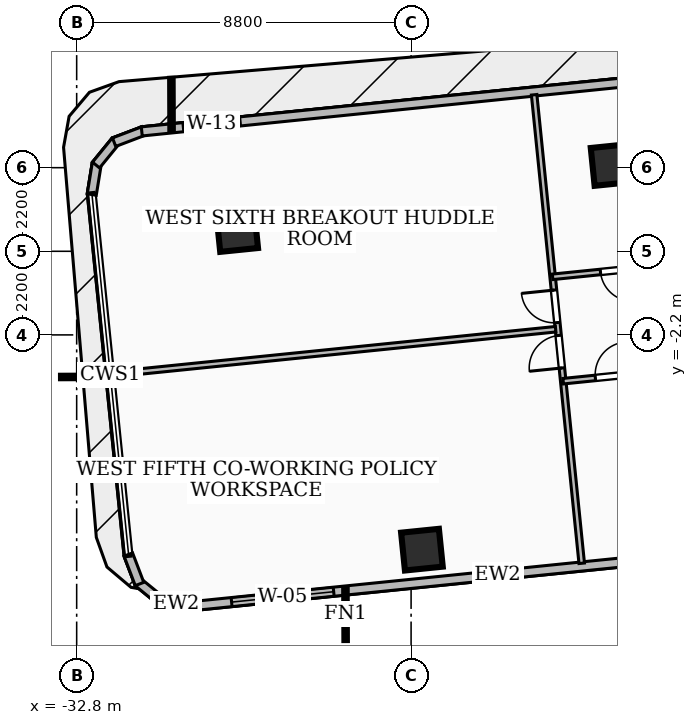
"""IFC4 building model, lengths in metres.
Left out: names, types, materials, properties, quantities, classifications, styles, units other than length and angle.
Written with IfcOpenShell. Run it as: python <this file> out.ifc"""

import sys

from ifc_helpers import new_model, si_unit, direction, frame, frame_2d, origin, origin_2d, place, context, subcontext, project, spatial, rectangle, extrude, element, fill, save


model = new_model("IFC4")
c1 = context("Model", 3, precision=1e-05, world=origin(), true_north=direction((0.0, 1.0)))
c2 = subcontext(c1, "Body", "Model", "MODEL_VIEW")
j1 = project(units=[si_unit("LENGTHUNIT", "METRE"), si_unit("PLANEANGLEUNIT", "RADIAN")], contexts=[c1])
p1 = place(None, origin())
s1 = spatial("IfcSite", under=j1, at=p1, CompositionType="ELEMENT")
p2 = place(p1, origin())
s2 = spatial("IfcBuilding", under=s1, at=p2, CompositionType="ELEMENT")
p3 = place(p2, frame((0.0, 0.0, 67.68)))
s3 = spatial("IfcBuildingStorey", under=s2, at=p3, CompositionType="ELEMENT", Elevation=67.68)
for number, where, z_axis, x_axis in (
    (1, (-18.724, 2.271, 0.0), (0.0, 0.0, 1.0), (0.995, 0.101, 0.0)),
    (2, (-28.576, 0.533, 0.0), (0.0, 0.0, 1.0), (0.995, 0.101, 0.0)),
    (3, (-23.715, -7.851, 0.0), (0.0, 0.0, 1.0), (0.995, 0.101, 0.0)),
):
    element("IfcColumn", number, at=place(p3, frame(where, z_axis=z_axis, x_axis=x_axis)), inside=s3, PredefinedType="COLUMN", context=c2, shape_type="SweptSolid", body=[
        extrude(rectangle(XDim=1.0, YDim=1.0, at=origin_2d()), origin(), (0.0, 0.0, 1.0), 3.6),
    ])
p4 = place(p3, frame((-13.626, -7.696, 0.0), z_axis=(0.0, 0.0, 1.0), x_axis=(-0.994872930989, -0.101132839298, 0.0)))
e4 = element("IfcWall", 4, at=p4, inside=s3, PredefinedType="SOLIDWALL", context=c2, shape_type="SweptSolid", body=[
    extrude(rectangle(XDim=16.276, YDim=0.24, at=frame_2d((8.138, 0.0))), origin(), (0.0, 0.0, 1.0), 3.34),
])
p5 = place(p4, frame((12.475, 0.0, 0.85)))
e5 = element("IfcOpeningElement", 5, at=p5, cuts=e4, PredefinedType="OPENING", context=c2, shape_type="SweptSolid", body=[
    extrude(rectangle(XDim=2.7, YDim=1.85, at=frame_2d((1.35, 0.925))), frame((0.0, 0.13, 0.0), z_axis=(0.0, -1.0, 0.0), x_axis=(1.0, 0.0, 0.0)), (0.0, 0.0, 1.0), 0.26),
])
p6 = place(p3, frame((-29.768, -9.343, 0.0), z_axis=(0.0, 0.0, 1.0), x_axis=(-0.987084128833, 0.160202754679, 0.0)))
e6 = element("IfcWall", 6, at=p6, inside=s3, PredefinedType="SOLIDWALL", context=c2, shape_type="SweptSolid", body=[
    extrude(rectangle(XDim=0.831, YDim=0.24, at=frame_2d((0.415, 0.0))), origin(), (0.0, 0.0, 1.0), 3.34),
])
p7 = place(p3, frame((-30.544, -9.23, 0.0), z_axis=(0.0, 0.0, 1.0), x_axis=(-0.774358164226, 0.632747527452, 0.0)))
e7 = element("IfcWall", 7, at=p7, inside=s3, PredefinedType="SOLIDWALL", context=c2, shape_type="SweptSolid", body=[
    extrude(rectangle(XDim=0.814, YDim=0.24, at=frame_2d((0.407, 0.0))), origin(), (0.0, 0.0, 1.0), 3.34),
])
p8 = place(p3, frame((-31.146, -8.754, 0.0), z_axis=(0.0, 0.0, 1.0), x_axis=(-0.355701438235, 0.934599639866, 0.0)))
e8 = element("IfcWall", 8, at=p8, inside=s3, PredefinedType="SOLIDWALL", context=c2, shape_type="SweptSolid", body=[
    extrude(rectangle(XDim=0.829, YDim=0.24, at=frame_2d((0.415, 0.0))), origin(), (0.0, 0.0, 1.0), 3.34),
])
p9 = place(p3, frame((-32.403, 1.493, 0.0), z_axis=(0.0, 0.0, 1.0), x_axis=(0.160156284613, 0.987091669755, 0.0)))
e9 = element("IfcWall", 9, at=p9, inside=s3, PredefinedType="SOLIDWALL", context=c2, shape_type="SweptSolid", body=[
    extrude(rectangle(XDim=0.831, YDim=0.24, at=frame_2d((0.416, 0.0))), origin(), (0.0, 0.0, 1.0), 3.34),
])
p10 = place(p3, frame((-32.29, 2.269, 0.0), z_axis=(0.0, 0.0, 1.0), x_axis=(0.632354425822, 0.774679211121, 0.0)))
e10 = element("IfcWall", 10, at=p10, inside=s3, PredefinedType="SOLIDWALL", context=c2, shape_type="SweptSolid", body=[
    extrude(rectangle(XDim=0.813, YDim=0.24, at=frame_2d((0.406, 0.0))), origin(), (0.0, 0.0, 1.0), 3.34),
])
p11 = place(p3, frame((-31.815, 2.871, 0.0), z_axis=(0.0, 0.0, 1.0), x_axis=(0.934748415991, 0.355310285248, 0.0)))
e11 = element("IfcWall", 11, at=p11, inside=s3, PredefinedType="SOLIDWALL", context=c2, shape_type="SweptSolid", body=[
    extrude(rectangle(XDim=0.83, YDim=0.24, at=frame_2d((0.415, 0.0))), origin(), (0.0, 0.0, 1.0), 3.34),
])
p12 = place(p3, frame((-31.087, 3.154, 0.0), z_axis=(0.0, 0.0, 1.0), x_axis=(0.994872777564, 0.101134348577, 0.0)))
e12 = element("IfcWall", 12, at=p12, inside=s3, PredefinedType="SOLIDWALL", context=c2, shape_type="SweptSolid", body=[
    extrude(rectangle(XDim=16.275, YDim=0.24, at=frame_2d((8.138, 0.0))), origin(), (0.0, 0.0, 1.0), 3.34),
])
p13 = place(p12, frame((1.1, 0.0, 0.85)))
e13 = element("IfcOpeningElement", 13, at=p13, cuts=e12, PredefinedType="OPENING", context=c2, shape_type="SweptSolid", body=[
    extrude(rectangle(XDim=1.5, YDim=1.8, at=frame_2d((0.75, 0.9))), frame((0.0, 0.13, 0.0), z_axis=(0.0, -1.0, 0.0), x_axis=(1.0, 0.0, 0.0)), (0.0, 0.0, 1.0), 0.26),
])
p14 = place(p3, frame((-19.997, -3.418, 0.0), z_axis=(0.0, 0.0, 1.0), x_axis=(0.994885342511, 0.101010669028, 0.0)))
e14 = element("IfcWall", 14, at=p14, inside=s3, PredefinedType="PARTITIONING", context=c2, shape_type="SweptSolid", body=[
    extrude(rectangle(XDim=5.951, YDim=0.145, at=frame_2d((2.975, 0.0))), origin(), (0.0, 0.0, 1.0), 3.34),
])
p15 = place(p14, frame((3.825, 0.0, 0.0)))
e15 = element("IfcOpeningElement", 15, at=p15, cuts=e14, PredefinedType="OPENING", context=c2, shape_type="SweptSolid", body=[
    extrude(rectangle(XDim=0.86, YDim=2.04, at=frame_2d((0.43, 1.02))), frame((0.0, 0.083, 0.0), z_axis=(0.0, -1.0, 0.0), x_axis=(1.0, 0.0, 0.0)), (0.0, 0.0, 1.0), 0.165),
])
p16 = place(p14, frame((0.85, 0.0, 0.0)))
e16 = element("IfcOpeningElement", 16, at=p16, cuts=e14, PredefinedType="OPENING", context=c2, shape_type="SweptSolid", body=[
    extrude(rectangle(XDim=0.86, YDim=2.04, at=frame_2d((0.43, 1.02))), frame((0.0, 0.083, 0.0), z_axis=(0.0, -1.0, 0.0), x_axis=(1.0, 0.0, 0.0)), (0.0, 0.0, 1.0), 0.165),
])
p17 = place(p3, frame((-14.356, -0.071, 0.0), z_axis=(0.0, 0.0, 1.0), x_axis=(-0.994884923871, -0.101014792254, 0.0)))
e17 = element("IfcWall", 17, at=p17, inside=s3, PredefinedType="PARTITIONING", context=c2, shape_type="SweptSolid", body=[
    extrude(rectangle(XDim=5.95, YDim=0.145, at=frame_2d((2.975, 0.0))), origin(), (0.0, 0.0, 1.0), 3.34),
])
p18 = place(p17, frame((0.85, 0.0, 0.0)))
e18 = element("IfcOpeningElement", 18, at=p18, cuts=e17, PredefinedType="OPENING", context=c2, shape_type="SweptSolid", body=[
    extrude(rectangle(XDim=0.86, YDim=2.04, at=frame_2d((0.43, 1.02))), frame((0.0, 0.083, 0.0), z_axis=(0.0, -1.0, 0.0), x_axis=(1.0, 0.0, 0.0)), (0.0, 0.0, 1.0), 0.165),
])
p19 = place(p17, frame((3.825, 0.0, 0.0)))
e19 = element("IfcOpeningElement", 19, at=p19, cuts=e17, PredefinedType="OPENING", context=c2, shape_type="SweptSolid", body=[
    extrude(rectangle(XDim=0.86, YDim=2.04, at=frame_2d((0.43, 1.02))), frame((0.0, 0.083, 0.0), z_axis=(0.0, -1.0, 0.0), x_axis=(1.0, 0.0, 0.0)), (0.0, 0.0, 1.0), 0.165),
])
p20 = place(p3, frame((-20.196, -2.051, 0.0), z_axis=(0.0, 0.0, 1.0), x_axis=(-0.994871935232, -0.101142634371, 0.0)))
e20 = element("IfcWall", 20, at=p20, inside=s3, PredefinedType="PARTITIONING", context=c2, shape_type="SweptSolid", body=[
    extrude(rectangle(XDim=11.695, YDim=0.145, at=frame_2d((5.848, 0.0))), origin(), (0.0, 0.0, 1.0), 2.793),
])
p21 = place(p3, frame((-19.51, -8.209, 0.0), z_axis=(0.0, 0.0, 1.0), x_axis=(-0.101042864496, 0.99488207318, 0.0)))
e21 = element("IfcWall", 21, at=p21, inside=s3, PredefinedType="PARTITIONING", context=c2, shape_type="SweptSolid", body=[
    extrude(rectangle(XDim=12.39, YDim=0.145, at=frame_2d((6.195, 0.0))), origin(), (0.0, 0.0, 1.0), 2.486),
])
p22 = place(p21, frame((6.365, 0.0, 0.0)))
e22 = element("IfcOpeningElement", 22, at=p22, cuts=e21, PredefinedType="OPENING", context=c2, shape_type="SweptSolid", body=[
    extrude(rectangle(XDim=0.86, YDim=2.04, at=frame_2d((0.43, 1.02))), frame((0.0, 0.083, 0.0), z_axis=(0.0, -1.0, 0.0), x_axis=(1.0, 0.0, 0.0)), (0.0, 0.0, 1.0), 0.165),
])
p23 = place(p21, frame((5.165, 0.0, 0.0)))
e23 = element("IfcOpeningElement", 23, at=p23, cuts=e21, PredefinedType="OPENING", context=c2, shape_type="SweptSolid", body=[
    extrude(rectangle(XDim=0.86, YDim=2.04, at=frame_2d((0.43, 1.02))), frame((0.0, 0.083, 0.0), z_axis=(0.0, -1.0, 0.0), x_axis=(1.0, 0.0, 0.0)), (0.0, 0.0, 1.0), 0.165),
])
p24 = place(p5, origin())
e24 = element("IfcWindow", 24, at=p24, inside=s3, PartitioningType="SINGLE_PANEL", PredefinedType="WINDOW", context=c2, shape_type="SweptSolid", body=[
    extrude(rectangle(XDim=2.7, YDim=1.85, at=frame_2d((1.35, 0.925))), frame((0.0, 0.03, 0.0), z_axis=(0.0, -1.0, 0.0), x_axis=(1.0, 0.0, 0.0)), (0.0, 0.0, 1.0), 0.06),
])
fill(e5, e24)
p25 = place(p13, origin())
e25 = element("IfcWindow", 25, at=p25, inside=s3, PartitioningType="SINGLE_PANEL", PredefinedType="WINDOW", context=c2, shape_type="SweptSolid", body=[
    extrude(rectangle(XDim=1.5, YDim=1.8, at=frame_2d((0.75, 0.9))), frame((0.0, 0.03, 0.0), z_axis=(0.0, -1.0, 0.0), x_axis=(1.0, 0.0, 0.0)), (0.0, 0.0, 1.0), 0.06),
])
fill(e13, e25)
p26 = place(p16, origin())
e26 = element("IfcDoor", 26, at=p26, inside=s3, OperationType="SINGLE_SWING_RIGHT", PredefinedType="DOOR", context=c2, shape_type="SweptSolid", body=[
    extrude(rectangle(XDim=0.86, YDim=2.04, at=frame_2d((0.43, 1.02))), frame((0.0, 0.025, 0.0), z_axis=(0.0, -1.0, 0.0), x_axis=(1.0, 0.0, 0.0)), (0.0, 0.0, 1.0), 0.05),
])
fill(e16, e26)
p27 = place(p19, origin())
e27 = element("IfcDoor", 27, at=p27, inside=s3, OperationType="SINGLE_SWING_LEFT", PredefinedType="DOOR", context=c2, shape_type="SweptSolid", body=[
    extrude(rectangle(XDim=0.86, YDim=2.04, at=frame_2d((0.43, 1.02))), frame((0.0, 0.025, 0.0), z_axis=(0.0, -1.0, 0.0), x_axis=(1.0, 0.0, 0.0)), (0.0, 0.0, 1.0), 0.05),
])
fill(e19, e27)
p28 = place(p22, origin())
e28 = element("IfcDoor", 28, at=p28, inside=s3, OperationType="SINGLE_SWING_RIGHT", PredefinedType="DOOR", context=c2, shape_type="SweptSolid", body=[
    extrude(rectangle(XDim=0.86, YDim=2.04, at=frame_2d((0.43, 1.02))), frame((0.0, 0.025, 0.0), z_axis=(0.0, -1.0, 0.0), x_axis=(1.0, 0.0, 0.0)), (0.0, 0.0, 1.0), 0.05),
])
fill(e22, e28)
p29 = place(p23, origin())
e29 = element("IfcDoor", 29, at=p29, inside=s3, OperationType="SINGLE_SWING_LEFT", PredefinedType="DOOR", context=c2, shape_type="SweptSolid", body=[
    extrude(rectangle(XDim=0.86, YDim=2.04, at=frame_2d((0.43, 1.02))), frame((0.0, 0.025, 0.0), z_axis=(0.0, -1.0, 0.0), x_axis=(1.0, 0.0, 0.0)), (0.0, 0.0, 1.0), 0.05),
])
fill(e23, e29)
save(model, sys.argv[1])
